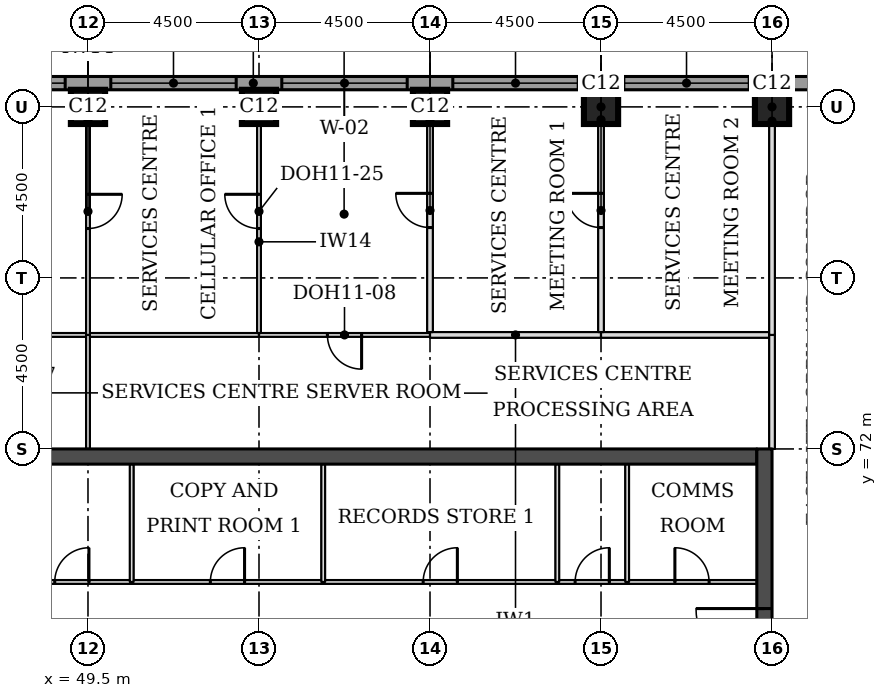
"""IFC4 building model, lengths in metres.
Left out: names, types, materials, properties, quantities, classifications, styles, units other than length and angle.
Written with IfcOpenShell. Run it as: python <this file> out.ifc"""

import sys

from ifc_helpers import new_model, si_unit, direction, frame, frame_2d, origin, origin_2d, place, context, subcontext, project, spatial, rectangle, extrude, element, fill, save


model = new_model("IFC4")
c1 = context("Model", 3, precision=1e-05, world=origin(), true_north=direction((0.0, 1.0)))
c2 = subcontext(c1, "Body", "Model", "MODEL_VIEW")
j1 = project(units=[si_unit("LENGTHUNIT", "METRE"), si_unit("PLANEANGLEUNIT", "RADIAN")], contexts=[c1])
p1 = place(None, origin())
s1 = spatial("IfcSite", under=j1, at=p1, CompositionType="ELEMENT")
p2 = place(p1, origin())
s2 = spatial("IfcBuilding", under=s1, at=p2, CompositionType="ELEMENT")
p3 = place(p2, frame((0.0, 0.0, 237.8)))
s3 = spatial("IfcBuildingStorey", under=s2, at=p3, CompositionType="ELEMENT", Elevation=237.8)
for number, where, z_axis, x_axis in (
    (1, (49.5, 81.0, 0.0), (0.0, 0.0, 1.0), (1.0, 0.0, 0.0)),
    (2, (54.0, 81.0, 0.0), (0.0, 0.0, 1.0), (1.0, 0.0, 0.0)),
    (3, (58.5, 81.0, 0.0), (0.0, 0.0, 1.0), (1.0, 0.0, 0.0)),
    (4, (63.0, 81.0, 0.0), (0.0, 0.0, 1.0), (1.0, 0.0, 0.0)),
    (5, (67.5, 81.0, 0.0), (0.0, 0.0, 1.0), (1.0, 0.0, 0.0)),
):
    element("IfcColumn", number, at=place(p3, frame(where, z_axis=z_axis, x_axis=x_axis)), inside=s3, PredefinedType="COLUMN", context=c2, shape_type="SweptSolid", body=[
        extrude(rectangle(XDim=0.9, YDim=0.9, at=origin_2d()), origin(), (0.0, 0.0, 1.0), 3.7),
    ])
p4 = place(p3, frame((45.4, 71.8, 0.0), z_axis=(0.0, 0.0, 1.0), x_axis=(1.0, 0.0, 0.0)))
e6 = element("IfcWall", 6, at=p4, inside=s3, PredefinedType="SHEAR", context=c2, shape_type="SweptSolid", body=[
    extrude(rectangle(XDim=21.7, YDim=0.4, at=frame_2d((10.85, 0.0))), origin(), (0.0, 0.0, 1.0), 3.7),
])
p5 = place(p3, frame((67.3, 49.5, 0.0), z_axis=(0.0, 0.0, 1.0), x_axis=(0.0, 1.0, 0.0)))
e7 = element("IfcWall", 7, at=p5, inside=s3, PredefinedType="SHEAR", context=c2, shape_type="SweptSolid", body=[
    extrude(rectangle(XDim=22.5, YDim=0.4, at=frame_2d((11.25, 0.0))), origin(), (0.0, 0.0, 1.0), 3.7),
])
p6 = place(p5, frame((4.2, 0.0, 0.0)))
e8 = element("IfcOpeningElement", 8, at=p6, cuts=e7, PredefinedType="OPENING", context=c2, shape_type="SweptSolid", body=[
    extrude(rectangle(XDim=1.8, YDim=2.1, at=frame_2d((0.9, 1.05))), frame((0.0, 0.21, 0.0), z_axis=(0.0, -1.0, 0.0), x_axis=(1.0, 0.0, 0.0)), (0.0, 0.0, 1.0), 0.42),
])
p7 = place(p5, frame((6.9, 0.0, 0.0)))
e9 = element("IfcOpeningElement", 9, at=p7, cuts=e7, PredefinedType="OPENING", context=c2, shape_type="SweptSolid", body=[
    extrude(rectangle(XDim=1.1, YDim=2.1, at=frame_2d((0.55, 1.05))), frame((0.0, 0.21, 0.0), z_axis=(0.0, -1.0, 0.0), x_axis=(1.0, 0.0, 0.0)), (0.0, 0.0, 1.0), 0.42),
])
p8 = place(p5, frame((13.6, 0.0, 0.0)))
e10 = element("IfcOpeningElement", 10, at=p8, cuts=e7, PredefinedType="OPENING", context=c2, shape_type="SweptSolid", body=[
    extrude(rectangle(XDim=1.1, YDim=2.1, at=frame_2d((0.55, 1.05))), frame((0.0, 0.21, 0.0), z_axis=(0.0, -1.0, 0.0), x_axis=(1.0, 0.0, 0.0)), (0.0, 0.0, 1.0), 0.42),
])
p9 = place(p5, frame((16.5, 0.0, 0.0)))
e11 = element("IfcOpeningElement", 11, at=p9, cuts=e7, PredefinedType="OPENING", context=c2, shape_type="SweptSolid", body=[
    extrude(rectangle(XDim=1.8, YDim=2.1, at=frame_2d((0.9, 1.05))), frame((0.0, 0.21, 0.0), z_axis=(0.0, -1.0, 0.0), x_axis=(1.0, 0.0, 0.0)), (0.0, 0.0, 1.0), 0.42),
])
p10 = place(p3, frame((72.331, 81.625, 0.0), z_axis=(0.0, 0.0, 1.0), x_axis=(-1.0, 0.0, 0.0)))
e12 = element("IfcWall", 12, at=p10, inside=s3, PredefinedType="STANDARD", context=c2, shape_type="SweptSolid", body=[
    extrude(rectangle(XDim=32.163, YDim=0.35, at=frame_2d((16.081, 0.0))), origin(), (0.0, 0.0, 1.0), 3.525),
])
p11 = place(p10, frame((5.431, 0.0, 0.9)))
e13 = element("IfcOpeningElement", 13, at=p11, cuts=e12, PredefinedType="OPENING", context=c2, shape_type="SweptSolid", body=[
    extrude(rectangle(XDim=3.3, YDim=1.9, at=frame_2d((1.65, 0.95))), frame((0.0, 0.185, 0.0), z_axis=(0.0, -1.0, 0.0), x_axis=(1.0, 0.0, 0.0)), (0.0, 0.0, 1.0), 0.37),
])
p12 = place(p10, frame((9.931, 0.0, 0.9)))
e14 = element("IfcOpeningElement", 14, at=p12, cuts=e12, PredefinedType="OPENING", context=c2, shape_type="SweptSolid", body=[
    extrude(rectangle(XDim=3.3, YDim=1.9, at=frame_2d((1.65, 0.95))), frame((0.0, 0.185, 0.0), z_axis=(0.0, -1.0, 0.0), x_axis=(1.0, 0.0, 0.0)), (0.0, 0.0, 1.0), 0.37),
])
p13 = place(p10, frame((14.431, 0.0, 0.9)))
e15 = element("IfcOpeningElement", 15, at=p13, cuts=e12, PredefinedType="OPENING", context=c2, shape_type="SweptSolid", body=[
    extrude(rectangle(XDim=3.3, YDim=1.9, at=frame_2d((1.65, 0.95))), frame((0.0, 0.185, 0.0), z_axis=(0.0, -1.0, 0.0), x_axis=(1.0, 0.0, 0.0)), (0.0, 0.0, 1.0), 0.37),
])
p14 = place(p10, frame((18.931, 0.0, 0.9)))
e16 = element("IfcOpeningElement", 16, at=p14, cuts=e12, PredefinedType="OPENING", context=c2, shape_type="SweptSolid", body=[
    extrude(rectangle(XDim=3.3, YDim=1.9, at=frame_2d((1.65, 0.95))), frame((0.0, 0.185, 0.0), z_axis=(0.0, -1.0, 0.0), x_axis=(1.0, 0.0, 0.0)), (0.0, 0.0, 1.0), 0.37),
])
p15 = place(p10, frame((23.431, 0.0, 0.9)))
e17 = element("IfcOpeningElement", 17, at=p15, cuts=e12, PredefinedType="OPENING", context=c2, shape_type="SweptSolid", body=[
    extrude(rectangle(XDim=3.3, YDim=1.9, at=frame_2d((1.65, 0.95))), frame((0.0, 0.185, 0.0), z_axis=(0.0, -1.0, 0.0), x_axis=(1.0, 0.0, 0.0)), (0.0, 0.0, 1.0), 0.37),
])
p16 = place(p3, frame((45.075, 75.0, 0.0), z_axis=(0.0, 0.0, 1.0), x_axis=(1.0, 0.0, 0.0)))
e18 = element("IfcWall", 18, at=p16, inside=s3, PredefinedType="PARTITIONING", context=c2, shape_type="SweptSolid", body=[
    extrude(rectangle(XDim=4.375, YDim=0.1, at=frame_2d((2.188, 0.0))), origin(), (0.0, 0.0, 1.0), 3.55),
])
p17 = place(p16, frame((1.75, 0.0, 0.0)))
e19 = element("IfcOpeningElement", 19, at=p17, cuts=e18, PredefinedType="OPENING", context=c2, shape_type="SweptSolid", body=[
    extrude(rectangle(XDim=0.9, YDim=2.1, at=frame_2d((0.45, 1.05))), frame((0.0, 0.06, 0.0), z_axis=(0.0, -1.0, 0.0), x_axis=(1.0, 0.0, 0.0)), (0.0, 0.0, 1.0), 0.12),
])
p18 = place(p3, frame((49.55, 75.0, 0.0), z_axis=(0.0, 0.0, 1.0), x_axis=(1.0, 0.0, 0.0)))
e20 = element("IfcWall", 20, at=p18, inside=s3, PredefinedType="PARTITIONING", context=c2, shape_type="SweptSolid", body=[
    extrude(rectangle(XDim=4.45, YDim=0.1, at=frame_2d((2.225, 0.0))), origin(), (0.0, 0.0, 1.0), 3.55),
])
p19 = place(p3, frame((54.0, 75.0, 0.0), z_axis=(0.0, 0.0, 1.0), x_axis=(1.0, 0.0, 0.0)))
e21 = element("IfcWall", 21, at=p19, inside=s3, PredefinedType="PARTITIONING", context=c2, shape_type="SweptSolid", body=[
    extrude(rectangle(XDim=4.5, YDim=0.1, at=frame_2d((2.25, 0.0))), origin(), (0.0, 0.0, 1.0), 3.55),
])
p20 = place(p19, frame((1.8, 0.0, 0.0)))
e22 = element("IfcOpeningElement", 22, at=p20, cuts=e21, PredefinedType="OPENING", context=c2, shape_type="SweptSolid", body=[
    extrude(rectangle(XDim=0.9, YDim=2.1, at=frame_2d((0.45, 1.05))), frame((0.0, 0.06, 0.0), z_axis=(0.0, -1.0, 0.0), x_axis=(1.0, 0.0, 0.0)), (0.0, 0.0, 1.0), 0.12),
])
p21 = place(p3, frame((58.5, 75.0, 0.0), z_axis=(0.0, 0.0, 1.0), x_axis=(1.0, 0.0, 0.0)))
e23 = element("IfcWall", 23, at=p21, inside=s3, PredefinedType="PARTITIONING", context=c2, shape_type="SweptSolid", body=[
    extrude(rectangle(XDim=4.5, YDim=0.15, at=frame_2d((2.25, 0.0))), origin(), (0.0, 0.0, 1.0), 3.55),
])
p22 = place(p3, frame((63.0, 75.0, 0.0), z_axis=(0.0, 0.0, 1.0), x_axis=(1.0, 0.0, 0.0)))
e24 = element("IfcWall", 24, at=p22, inside=s3, PredefinedType="PARTITIONING", context=c2, shape_type="SweptSolid", body=[
    extrude(rectangle(XDim=4.425, YDim=0.15, at=frame_2d((2.212, 0.0))), origin(), (0.0, 0.0, 1.0), 3.55),
])
p23 = place(p3, frame((49.5, 72.0, 0.0), z_axis=(0.0, 0.0, 1.0), x_axis=(0.0, 1.0, 0.0)))
e25 = element("IfcWall", 25, at=p23, inside=s3, PredefinedType="PARTITIONING", context=c2, shape_type="SweptSolid", body=[
    extrude(rectangle(XDim=3.0, YDim=0.1, at=frame_2d((1.5, 0.0))), origin(), (0.0, 0.0, 1.0), 3.55),
])
p24 = place(p3, frame((67.5, 72.0, 0.0), z_axis=(0.0, 0.0, 1.0), x_axis=(0.0, 1.0, 0.0)))
e26 = element("IfcWall", 26, at=p24, inside=s3, PredefinedType="PARTITIONING", context=c2, shape_type="SweptSolid", body=[
    extrude(rectangle(XDim=3.0, YDim=0.15, at=frame_2d((1.5, 0.0))), origin(), (0.0, 0.0, 1.0), 3.022),
])
p25 = place(p3, frame((49.5, 75.0, 0.0), z_axis=(0.0, 0.0, 1.0), x_axis=(0.0, 1.0, 0.0)))
e27 = element("IfcWall", 27, at=p25, inside=s3, PredefinedType="PARTITIONING", context=c2, shape_type="SweptSolid", body=[
    extrude(rectangle(XDim=6.45, YDim=0.1, at=frame_2d((3.225, 0.0))), origin(), (0.0, 0.0, 1.0), 3.55),
])
p26 = place(p25, frame((2.8, 0.0, 0.0)))
e28 = element("IfcOpeningElement", 28, at=p26, cuts=e27, PredefinedType="OPENING", context=c2, shape_type="SweptSolid", body=[
    extrude(rectangle(XDim=0.9, YDim=2.1, at=frame_2d((0.45, 1.05))), frame((0.0, 0.06, 0.0), z_axis=(0.0, -1.0, 0.0), x_axis=(1.0, 0.0, 0.0)), (0.0, 0.0, 1.0), 0.12),
])
p27 = place(p3, frame((67.5, 75.0, 0.0), z_axis=(0.0, 0.0, 1.0), x_axis=(0.0, 1.0, 0.0)))
e29 = element("IfcWall", 29, at=p27, inside=s3, PredefinedType="PARTITIONING", context=c2, shape_type="SweptSolid", body=[
    extrude(rectangle(XDim=6.45, YDim=0.15, at=frame_2d((3.225, 0.0))), origin(), (0.0, 0.0, 1.0), 3.022),
])
p28 = place(p3, frame((54.0, 75.05, 0.0), z_axis=(0.0, 0.0, 1.0), x_axis=(0.0, 1.0, 0.0)))
e30 = element("IfcWall", 30, at=p28, inside=s3, PredefinedType="PARTITIONING", context=c2, shape_type="SweptSolid", body=[
    extrude(rectangle(XDim=6.4, YDim=0.1, at=frame_2d((3.2, 0.0))), origin(), (0.0, 0.0, 1.0), 3.55),
])
p29 = place(p28, frame((2.75, 0.0, 0.0)))
e31 = element("IfcOpeningElement", 31, at=p29, cuts=e30, PredefinedType="OPENING", context=c2, shape_type="SweptSolid", body=[
    extrude(rectangle(XDim=0.9, YDim=2.1, at=frame_2d((0.45, 1.05))), frame((0.0, 0.06, 0.0), z_axis=(0.0, -1.0, 0.0), x_axis=(1.0, 0.0, 0.0)), (0.0, 0.0, 1.0), 0.12),
])
p30 = place(p3, frame((58.5, 75.075, 0.0), z_axis=(0.0, 0.0, 1.0), x_axis=(0.0, 1.0, 0.0)))
e32 = element("IfcWall", 32, at=p30, inside=s3, PredefinedType="PARTITIONING", context=c2, shape_type="SweptSolid", body=[
    extrude(rectangle(XDim=6.375, YDim=0.15, at=frame_2d((3.188, 0.0))), origin(), (0.0, 0.0, 1.0), 3.55),
])
p31 = place(p30, frame((2.75, 0.0, 0.0)))
e33 = element("IfcOpeningElement", 33, at=p31, cuts=e32, PredefinedType="OPENING", context=c2, shape_type="SweptSolid", body=[
    extrude(rectangle(XDim=0.9, YDim=2.1, at=frame_2d((0.45, 1.05))), frame((0.0, 0.085, 0.0), z_axis=(0.0, -1.0, 0.0), x_axis=(1.0, 0.0, 0.0)), (0.0, 0.0, 1.0), 0.17),
])
p32 = place(p3, frame((63.0, 75.075, 0.0), z_axis=(0.0, 0.0, 1.0), x_axis=(0.0, 1.0, 0.0)))
e34 = element("IfcWall", 34, at=p32, inside=s3, PredefinedType="PARTITIONING", context=c2, shape_type="SweptSolid", body=[
    extrude(rectangle(XDim=6.375, YDim=0.15, at=frame_2d((3.188, 0.0))), origin(), (0.0, 0.0, 1.0), 3.55),
])
p33 = place(p32, frame((2.75, 0.0, 0.0)))
e35 = element("IfcOpeningElement", 35, at=p33, cuts=e34, PredefinedType="OPENING", context=c2, shape_type="SweptSolid", body=[
    extrude(rectangle(XDim=0.9, YDim=2.1, at=frame_2d((0.45, 1.05))), frame((0.0, 0.085, 0.0), z_axis=(0.0, -1.0, 0.0), x_axis=(1.0, 0.0, 0.0)), (0.0, 0.0, 1.0), 0.17),
])
p34 = place(p3, frame((45.4, 68.5, 0.0), z_axis=(0.0, 0.0, 1.0), x_axis=(1.0, 0.0, 0.0)))
e36 = element("IfcWall", 36, at=p34, inside=s3, PredefinedType="PARTITIONING", context=c2, shape_type="SweptSolid", body=[
    extrude(rectangle(XDim=21.7, YDim=0.1, at=frame_2d((10.85, 0.0))), origin(), (0.0, 0.0, 1.0), 3.55),
])
p35 = place(p34, frame((19.544, 0.0, 0.0)))
e37 = element("IfcOpeningElement", 37, at=p35, cuts=e36, PredefinedType="OPENING", context=c2, shape_type="SweptSolid", body=[
    extrude(rectangle(XDim=0.9, YDim=2.1, at=frame_2d((0.45, 1.05))), frame((0.0, 0.06, 0.0), z_axis=(0.0, -1.0, 0.0), x_axis=(1.0, 0.0, 0.0)), (0.0, 0.0, 1.0), 0.12),
])
p36 = place(p34, frame((16.919, 0.0, 0.0)))
e38 = element("IfcOpeningElement", 38, at=p36, cuts=e36, PredefinedType="OPENING", context=c2, shape_type="SweptSolid", body=[
    extrude(rectangle(XDim=0.9, YDim=2.1, at=frame_2d((0.45, 1.05))), frame((0.0, 0.06, 0.0), z_axis=(0.0, -1.0, 0.0), x_axis=(1.0, 0.0, 0.0)), (0.0, 0.0, 1.0), 0.12),
])
p37 = place(p34, frame((0.6, 0.0, 0.0)))
e39 = element("IfcOpeningElement", 39, at=p37, cuts=e36, PredefinedType="OPENING", context=c2, shape_type="SweptSolid", body=[
    extrude(rectangle(XDim=0.9, YDim=2.1, at=frame_2d((0.45, 1.05))), frame((0.0, 0.06, 0.0), z_axis=(0.0, -1.0, 0.0), x_axis=(1.0, 0.0, 0.0)), (0.0, 0.0, 1.0), 0.12),
])
p38 = place(p34, frame((3.225, 0.0, 0.0)))
e40 = element("IfcOpeningElement", 40, at=p38, cuts=e36, PredefinedType="OPENING", context=c2, shape_type="SweptSolid", body=[
    extrude(rectangle(XDim=0.9, YDim=2.1, at=frame_2d((0.45, 1.05))), frame((0.0, 0.06, 0.0), z_axis=(0.0, -1.0, 0.0), x_axis=(1.0, 0.0, 0.0)), (0.0, 0.0, 1.0), 0.12),
])
p39 = place(p34, frame((12.92, 0.0, 0.0)))
e41 = element("IfcOpeningElement", 41, at=p39, cuts=e36, PredefinedType="OPENING", context=c2, shape_type="SweptSolid", body=[
    extrude(rectangle(XDim=0.9, YDim=2.1, at=frame_2d((0.45, 1.05))), frame((0.0, 0.06, 0.0), z_axis=(0.0, -1.0, 0.0), x_axis=(1.0, 0.0, 0.0)), (0.0, 0.0, 1.0), 0.12),
])
p40 = place(p34, frame((7.32, 0.0, 0.0)))
e42 = element("IfcOpeningElement", 42, at=p40, cuts=e36, PredefinedType="OPENING", context=c2, shape_type="SweptSolid", body=[
    extrude(rectangle(XDim=0.9, YDim=2.1, at=frame_2d((0.45, 1.05))), frame((0.0, 0.06, 0.0), z_axis=(0.0, -1.0, 0.0), x_axis=(1.0, 0.0, 0.0)), (0.0, 0.0, 1.0), 0.12),
])
for number, where, z_axis, x_axis in (
    (43, (50.65, 68.5, 0.0), (0.0, 0.0, 1.0), (0.0, 1.0, 0.0)),
    (44, (55.69, 68.5, 0.0), (0.0, 0.0, 1.0), (0.0, 1.0, 0.0)),
    (45, (61.85, 68.5, 0.0), (0.0, 0.0, 1.0), (0.0, 1.0, 0.0)),
    (46, (63.688, 68.5, 0.0), (0.0, 0.0, 1.0), (0.0, 1.0, 0.0)),
):
    element("IfcWall", number, at=place(p3, frame(where, z_axis=z_axis, x_axis=x_axis)), inside=s3, PredefinedType="PARTITIONING", context=c2, shape_type="SweptSolid", body=[
        extrude(rectangle(XDim=3.1, YDim=0.1, at=frame_2d((1.55, 0.0))), origin(), (0.0, 0.0, 1.0), 3.55),
    ])
p41 = place(p11, origin())
e47 = element("IfcWindow", 47, at=p41, inside=s3, PartitioningType="SINGLE_PANEL", PredefinedType="WINDOW", context=c2, shape_type="SweptSolid", body=[
    extrude(rectangle(XDim=3.3, YDim=1.9, at=frame_2d((1.65, 0.95))), frame((0.0, 0.085, 0.0), z_axis=(0.0, -1.0, 0.0), x_axis=(1.0, 0.0, 0.0)), (0.0, 0.0, 1.0), 0.06),
])
fill(e13, e47)
p42 = place(p12, origin())
e48 = element("IfcWindow", 48, at=p42, inside=s3, PartitioningType="SINGLE_PANEL", PredefinedType="WINDOW", context=c2, shape_type="SweptSolid", body=[
    extrude(rectangle(XDim=3.3, YDim=1.9, at=frame_2d((1.65, 0.95))), frame((0.0, 0.085, 0.0), z_axis=(0.0, -1.0, 0.0), x_axis=(1.0, 0.0, 0.0)), (0.0, 0.0, 1.0), 0.06),
])
fill(e14, e48)
p43 = place(p13, origin())
e49 = element("IfcWindow", 49, at=p43, inside=s3, PartitioningType="SINGLE_PANEL", PredefinedType="WINDOW", context=c2, shape_type="SweptSolid", body=[
    extrude(rectangle(XDim=3.3, YDim=1.9, at=frame_2d((1.65, 0.95))), frame((0.0, 0.085, 0.0), z_axis=(0.0, -1.0, 0.0), x_axis=(1.0, 0.0, 0.0)), (0.0, 0.0, 1.0), 0.06),
])
fill(e15, e49)
p44 = place(p14, origin())
e50 = element("IfcWindow", 50, at=p44, inside=s3, PartitioningType="SINGLE_PANEL", PredefinedType="WINDOW", context=c2, shape_type="SweptSolid", body=[
    extrude(rectangle(XDim=3.3, YDim=1.9, at=frame_2d((1.65, 0.95))), frame((0.0, 0.085, 0.0), z_axis=(0.0, -1.0, 0.0), x_axis=(1.0, 0.0, 0.0)), (0.0, 0.0, 1.0), 0.06),
])
fill(e16, e50)
p45 = place(p15, origin())
e51 = element("IfcWindow", 51, at=p45, inside=s3, PartitioningType="SINGLE_PANEL", PredefinedType="WINDOW", context=c2, shape_type="SweptSolid", body=[
    extrude(rectangle(XDim=3.3, YDim=1.9, at=frame_2d((1.65, 0.95))), frame((0.0, 0.085, 0.0), z_axis=(0.0, -1.0, 0.0), x_axis=(1.0, 0.0, 0.0)), (0.0, 0.0, 1.0), 0.06),
])
fill(e17, e51)
p46 = place(p26, frame((0.9, 0.0, 0.0), z_axis=(0.0, 0.0, 1.0), x_axis=(-1.0, 0.0, 0.0)))
e52 = element("IfcDoor", 52, at=p46, inside=s3, OperationType="SINGLE_SWING_LEFT", PredefinedType="DOOR", context=c2, shape_type="SweptSolid", body=[
    extrude(rectangle(XDim=0.9, YDim=2.1, at=frame_2d((0.45, 1.05))), frame((0.0, 0.025, 0.0), z_axis=(0.0, -1.0, 0.0), x_axis=(1.0, 0.0, 0.0)), (0.0, 0.0, 1.0), 0.05),
])
fill(e28, e52)
p47 = place(p29, origin())
e53 = element("IfcDoor", 53, at=p47, inside=s3, OperationType="SINGLE_SWING_RIGHT", PredefinedType="DOOR", context=c2, shape_type="SweptSolid", body=[
    extrude(rectangle(XDim=0.9, YDim=2.1, at=frame_2d((0.45, 1.05))), frame((0.0, 0.025, 0.0), z_axis=(0.0, -1.0, 0.0), x_axis=(1.0, 0.0, 0.0)), (0.0, 0.0, 1.0), 0.05),
])
fill(e31, e53)
p48 = place(p31, origin())
e54 = element("IfcDoor", 54, at=p48, inside=s3, OperationType="SINGLE_SWING_RIGHT", PredefinedType="DOOR", context=c2, shape_type="SweptSolid", body=[
    extrude(rectangle(XDim=0.9, YDim=2.1, at=frame_2d((0.45, 1.05))), frame((0.0, 0.025, 0.0), z_axis=(0.0, -1.0, 0.0), x_axis=(1.0, 0.0, 0.0)), (0.0, 0.0, 1.0), 0.05),
])
fill(e33, e54)
p49 = place(p33, origin())
e55 = element("IfcDoor", 55, at=p49, inside=s3, OperationType="SINGLE_SWING_RIGHT", PredefinedType="DOOR", context=c2, shape_type="SweptSolid", body=[
    extrude(rectangle(XDim=0.9, YDim=2.1, at=frame_2d((0.45, 1.05))), frame((0.0, 0.025, 0.0), z_axis=(0.0, -1.0, 0.0), x_axis=(1.0, 0.0, 0.0)), (0.0, 0.0, 1.0), 0.05),
])
fill(e35, e55)
p50 = place(p20, frame((0.9, 0.0, 0.0), z_axis=(0.0, 0.0, 1.0), x_axis=(-1.0, 0.0, 0.0)))
e56 = element("IfcDoor", 56, at=p50, inside=s3, OperationType="SINGLE_SWING_LEFT", PredefinedType="DOOR", context=c2, shape_type="SweptSolid", body=[
    extrude(rectangle(XDim=0.9, YDim=2.1, at=frame_2d((0.45, 1.05))), frame((0.0, 0.025, 0.0), z_axis=(0.0, -1.0, 0.0), x_axis=(1.0, 0.0, 0.0)), (0.0, 0.0, 1.0), 0.05),
])
fill(e22, e56)
p51 = place(p9, origin())
e57 = element("IfcDoor", 57, at=p51, inside=s3, OperationType="SINGLE_SWING_RIGHT", PredefinedType="DOOR", context=c2, shape_type="SweptSolid", body=[
    extrude(rectangle(XDim=1.8, YDim=2.1, at=frame_2d((0.9, 1.05))), frame((0.0, 0.025, 0.0), z_axis=(0.0, -1.0, 0.0), x_axis=(1.0, 0.0, 0.0)), (0.0, 0.0, 1.0), 0.05),
])
fill(e11, e57)
p52 = place(p35, origin())
e58 = element("IfcDoor", 58, at=p52, inside=s3, OperationType="SINGLE_SWING_LEFT", PredefinedType="DOOR", context=c2, shape_type="SweptSolid", body=[
    extrude(rectangle(XDim=0.9, YDim=2.1, at=frame_2d((0.45, 1.05))), frame((0.0, 0.025, 0.0), z_axis=(0.0, -1.0, 0.0), x_axis=(1.0, 0.0, 0.0)), (0.0, 0.0, 1.0), 0.05),
])
fill(e37, e58)
p53 = place(p36, origin())
e59 = element("IfcDoor", 59, at=p53, inside=s3, OperationType="SINGLE_SWING_RIGHT", PredefinedType="DOOR", context=c2, shape_type="SweptSolid", body=[
    extrude(rectangle(XDim=0.9, YDim=2.1, at=frame_2d((0.45, 1.05))), frame((0.0, 0.025, 0.0), z_axis=(0.0, -1.0, 0.0), x_axis=(1.0, 0.0, 0.0)), (0.0, 0.0, 1.0), 0.05),
])
fill(e38, e59)
p54 = place(p38, origin())
e60 = element("IfcDoor", 60, at=p54, inside=s3, OperationType="SINGLE_SWING_RIGHT", PredefinedType="DOOR", context=c2, shape_type="SweptSolid", body=[
    extrude(rectangle(XDim=0.9, YDim=2.1, at=frame_2d((0.45, 1.05))), frame((0.0, 0.025, 0.0), z_axis=(0.0, -1.0, 0.0), x_axis=(1.0, 0.0, 0.0)), (0.0, 0.0, 1.0), 0.05),
])
fill(e40, e60)
p55 = place(p39, origin())
e61 = element("IfcDoor", 61, at=p55, inside=s3, OperationType="SINGLE_SWING_RIGHT", PredefinedType="DOOR", context=c2, shape_type="SweptSolid", body=[
    extrude(rectangle(XDim=0.9, YDim=2.1, at=frame_2d((0.45, 1.05))), frame((0.0, 0.025, 0.0), z_axis=(0.0, -1.0, 0.0), x_axis=(1.0, 0.0, 0.0)), (0.0, 0.0, 1.0), 0.05),
])
fill(e41, e61)
p56 = place(p40, origin())
e62 = element("IfcDoor", 62, at=p56, inside=s3, OperationType="SINGLE_SWING_RIGHT", PredefinedType="DOOR", context=c2, shape_type="SweptSolid", body=[
    extrude(rectangle(XDim=0.9, YDim=2.1, at=frame_2d((0.45, 1.05))), frame((0.0, 0.025, 0.0), z_axis=(0.0, -1.0, 0.0), x_axis=(1.0, 0.0, 0.0)), (0.0, 0.0, 1.0), 0.05),
])
fill(e42, e62)
save(model, sys.argv[1])
